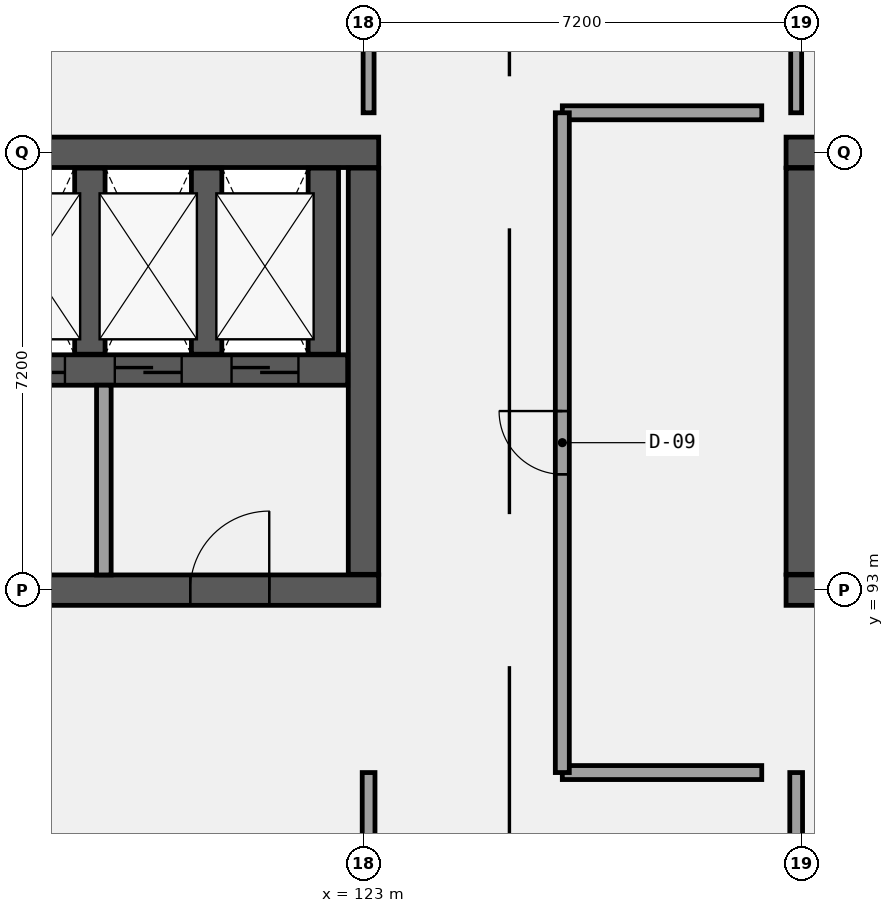
"""IFC4 building model, lengths in metres.
Left out: names, types, materials, properties, quantities, classifications, styles, units other than length and angle.
Written with IfcOpenShell. Run it as: python <this file> out.ifc"""

import sys

from ifc_helpers import new_model, si_unit, direction, frame, frame_2d, origin, place, context, subcontext, project, spatial, rectangle, extrude, element, fill, save


model = new_model("IFC4")
c1 = context("Model", 3, precision=1e-05, world=origin(), true_north=direction((0.0, 1.0)))
c2 = subcontext(c1, "Body", "Model", "MODEL_VIEW")
j1 = project(units=[si_unit("LENGTHUNIT", "METRE"), si_unit("PLANEANGLEUNIT", "RADIAN")], contexts=[c1])
p1 = place(None, origin())
s1 = spatial("IfcSite", under=j1, at=p1, CompositionType="ELEMENT")
p2 = place(p1, origin())
s2 = spatial("IfcBuilding", under=s1, at=p2, CompositionType="ELEMENT")
p3 = place(p2, frame((0.0, 0.0, 5.4)))
s3 = spatial("IfcBuildingStorey", under=s2, at=p3, CompositionType="ELEMENT", Elevation=5.4)
p4 = place(p3, frame((108.35, 100.2, 0.0), z_axis=(0.0, 0.0, 1.0), x_axis=(1.0, 0.0, 0.0)))
e1 = element("IfcWall", 1, at=p4, inside=s3, PredefinedType="SHEAR", context=c2, shape_type="SweptSolid", body=[
    extrude(rectangle(XDim=14.9, YDim=0.5, at=frame_2d((7.45, 0.0))), origin(), (0.0, 0.0, 1.0), 4.2),
])
p5 = place(p3, frame((108.35, 93.0, 0.0), z_axis=(0.0, 0.0, 1.0), x_axis=(1.0, 0.0, 0.0)))
e2 = element("IfcWall", 2, at=p5, inside=s3, PredefinedType="SHEAR", context=c2, shape_type="SweptSolid", body=[
    extrude(rectangle(XDim=14.9, YDim=0.5, at=frame_2d((7.45, 0.0))), origin(), (0.0, 0.0, 1.0), 4.2),
])
p6 = place(p5, frame((3.8, 0.0, 0.0)))
e3 = element("IfcOpeningElement", 3, at=p6, cuts=e2, PredefinedType="OPENING", context=c2, shape_type="SweptSolid", body=[
    extrude(rectangle(XDim=1.3, YDim=2.2, at=frame_2d((0.65, 1.1))), frame((0.0, 0.26, 0.0), z_axis=(0.0, -1.0, 0.0), x_axis=(1.0, 0.0, 0.0)), (0.0, 0.0, 1.0), 0.52),
])
p7 = place(p5, frame((11.8, 0.0, 0.0)))
e4 = element("IfcOpeningElement", 4, at=p7, cuts=e2, PredefinedType="OPENING", context=c2, shape_type="SweptSolid", body=[
    extrude(rectangle(XDim=1.3, YDim=2.2, at=frame_2d((0.65, 1.1))), frame((0.0, 0.26, 0.0), z_axis=(0.0, -1.0, 0.0), x_axis=(1.0, 0.0, 0.0)), (0.0, 0.0, 1.0), 0.52),
])
p8 = place(p3, frame((123.0, 93.26, 0.0), z_axis=(0.0, 0.0, 1.0), x_axis=(0.0, 1.0, 0.0)))
e5 = element("IfcWall", 5, at=p8, inside=s3, PredefinedType="SHEAR", context=c2, shape_type="SweptSolid", body=[
    extrude(rectangle(XDim=6.68, YDim=0.5, at=frame_2d((3.34, 0.0))), origin(), (0.0, 0.0, 1.0), 4.2),
])
p9 = place(p3, frame((108.86, 96.62, 0.0), z_axis=(0.0, 0.0, 1.0), x_axis=(1.0, 0.0, 0.0)))
e6 = element("IfcWall", 6, at=p9, inside=s3, PredefinedType="SHEAR", context=c2, shape_type="SweptSolid", body=[
    extrude(rectangle(XDim=13.88, YDim=0.5, at=frame_2d((6.94, 0.0))), origin(), (0.0, 0.0, 1.0), 4.2),
])
p10 = place(p9, frame((8.13, 0.0, 0.0)))
e7 = element("IfcOpeningElement", 7, at=p10, cuts=e6, PredefinedType="OPENING", context=c2, shape_type="SweptSolid", body=[
    extrude(rectangle(XDim=1.1, YDim=2.15, at=frame_2d((0.55, 1.075))), frame((0.0, 0.26, 0.0), z_axis=(0.0, -1.0, 0.0), x_axis=(1.0, 0.0, 0.0)), (0.0, 0.0, 1.0), 0.52),
])
p11 = place(p9, frame((10.05, 0.0, 0.0)))
e8 = element("IfcOpeningElement", 8, at=p11, cuts=e6, PredefinedType="OPENING", context=c2, shape_type="SweptSolid", body=[
    extrude(rectangle(XDim=1.1, YDim=2.15, at=frame_2d((0.55, 1.075))), frame((0.0, 0.26, 0.0), z_axis=(0.0, -1.0, 0.0), x_axis=(1.0, 0.0, 0.0)), (0.0, 0.0, 1.0), 0.52),
])
p12 = place(p9, frame((11.97, 0.0, 0.0)))
e9 = element("IfcOpeningElement", 9, at=p12, cuts=e6, PredefinedType="OPENING", context=c2, shape_type="SweptSolid", body=[
    extrude(rectangle(XDim=1.1, YDim=2.15, at=frame_2d((0.55, 1.075))), frame((0.0, 0.26, 0.0), z_axis=(0.0, -1.0, 0.0), x_axis=(1.0, 0.0, 0.0)), (0.0, 0.0, 1.0), 0.52),
])
p13 = place(p9, frame((0.315, 0.0, 0.0)))
e10 = element("IfcOpeningElement", 10, at=p13, cuts=e6, PredefinedType="OPENING", context=c2, shape_type="SweptSolid", body=[
    extrude(rectangle(XDim=1.15, YDim=2.15, at=frame_2d((0.575, 1.075))), frame((0.0, 0.26, 0.0), z_axis=(0.0, -1.0, 0.0), x_axis=(1.0, 0.0, 0.0)), (0.0, 0.0, 1.0), 0.52),
])
for number, where, z_axis, x_axis in (
    (11, (118.5, 96.88, 0.0), (0.0, 0.0, 1.0), (0.0, 1.0, 0.0)),
    (12, (120.42, 96.88, 0.0), (0.0, 0.0, 1.0), (0.0, 1.0, 0.0)),
    (13, (122.34, 96.88, 0.0), (0.0, 0.0, 1.0), (0.0, 1.0, 0.0)),
):
    element("IfcWall", number, at=place(p3, frame(where, z_axis=z_axis, x_axis=x_axis)), inside=s3, PredefinedType="SHEAR", context=c2, shape_type="SweptSolid", body=[
        extrude(rectangle(XDim=3.06, YDim=0.5, at=frame_2d((1.53, 0.0))), origin(), (0.0, 0.0, 1.0), 4.2),
    ])
p14 = place(p3, frame((129.95, 100.2, 0.0), z_axis=(0.0, 0.0, 1.0), x_axis=(1.0, 0.0, 0.0)))
e14 = element("IfcWall", 14, at=p14, inside=s3, PredefinedType="SHEAR", context=c2, shape_type="SweptSolid", body=[
    extrude(rectangle(XDim=14.9, YDim=0.5, at=frame_2d((7.45, 0.0))), origin(), (0.0, 0.0, 1.0), 4.2),
])
p15 = place(p3, frame((129.95, 93.0, 0.0), z_axis=(0.0, 0.0, 1.0), x_axis=(1.0, 0.0, 0.0)))
e15 = element("IfcWall", 15, at=p15, inside=s3, PredefinedType="SHEAR", context=c2, shape_type="SweptSolid", body=[
    extrude(rectangle(XDim=14.9, YDim=0.5, at=frame_2d((7.45, 0.0))), origin(), (0.0, 0.0, 1.0), 4.2),
])
p16 = place(p15, frame((3.8, 0.0, 0.0)))
e16 = element("IfcOpeningElement", 16, at=p16, cuts=e15, PredefinedType="OPENING", context=c2, shape_type="SweptSolid", body=[
    extrude(rectangle(XDim=1.3, YDim=2.2, at=frame_2d((0.65, 1.1))), frame((0.0, 0.26, 0.0), z_axis=(0.0, -1.0, 0.0), x_axis=(1.0, 0.0, 0.0)), (0.0, 0.0, 1.0), 0.52),
])
p17 = place(p15, frame((11.8, 0.0, 0.0)))
e17 = element("IfcOpeningElement", 17, at=p17, cuts=e15, PredefinedType="OPENING", context=c2, shape_type="SweptSolid", body=[
    extrude(rectangle(XDim=1.3, YDim=2.2, at=frame_2d((0.65, 1.1))), frame((0.0, 0.26, 0.0), z_axis=(0.0, -1.0, 0.0), x_axis=(1.0, 0.0, 0.0)), (0.0, 0.0, 1.0), 0.52),
])
p18 = place(p3, frame((130.2, 93.26, 0.0), z_axis=(0.0, 0.0, 1.0), x_axis=(0.0, 1.0, 0.0)))
e18 = element("IfcWall", 18, at=p18, inside=s3, PredefinedType="SHEAR", context=c2, shape_type="SweptSolid", body=[
    extrude(rectangle(XDim=6.68, YDim=0.5, at=frame_2d((3.34, 0.0))), origin(), (0.0, 0.0, 1.0), 4.2),
])
p19 = place(p3, frame((118.73, 93.25, 0.0), z_axis=(0.0, 0.0, 1.0), x_axis=(0.0, 1.0, 0.0)))
e19 = element("IfcWall", 19, at=p19, inside=s3, PredefinedType="SOLIDWALL", context=c2, shape_type="SweptSolid", body=[
    extrude(rectangle(XDim=3.12, YDim=0.24, at=frame_2d((1.56, 0.0))), origin(), (0.0, 0.0, 1.0), 3.89),
])
p20 = place(p3, frame((123.084, 100.85, 0.0), z_axis=(0.0, 0.0, 1.0), x_axis=(0.0, 1.0, 0.0)))
e20 = element("IfcWall", 20, at=p20, inside=s3, PredefinedType="PARTITIONING", context=c2, shape_type="SweptSolid", body=[
    extrude(rectangle(XDim=7.29, YDim=0.18, at=frame_2d((3.645, 0.0))), origin(), (0.0, 0.0, 1.0), 3.27),
])
p21 = place(p3, frame((130.116, 100.85, 0.0), z_axis=(0.0, 0.0, 1.0), x_axis=(0.0, 1.0, 0.0)))
e21 = element("IfcWall", 21, at=p21, inside=s3, PredefinedType="PARTITIONING", context=c2, shape_type="SweptSolid", body=[
    extrude(rectangle(XDim=7.29, YDim=0.18, at=frame_2d((3.645, 0.0))), origin(), (0.0, 0.0, 1.0), 3.17),
])
for number, where, z_axis, x_axis in (
    (22, (123.084, 81.64, 0.0), (0.0, 0.0, 1.0), (0.0, 1.0, 0.0)),
    (23, (130.116, 81.64, 0.0), (0.0, 0.0, 1.0), (0.0, 1.0, 0.0)),
):
    element("IfcWall", number, at=place(p3, frame(where, z_axis=z_axis, x_axis=x_axis)), inside=s3, PredefinedType="PARTITIONING", context=c2, shape_type="SweptSolid", body=[
        extrude(rectangle(XDim=8.36, YDim=0.21, at=frame_2d((4.18, 0.0))), origin(), (0.0, 0.0, 1.0), 2.92),
    ])
for number, where, z_axis, x_axis in (
    (24, (126.27, 90.0, 0.0), (0.0, 0.0, 1.0), (1.0, 0.0, 0.0)),
    (25, (126.27, 100.85, 0.0), (0.0, 0.0, 1.0), (1.0, 0.0, 0.0)),
):
    element("IfcWall", number, at=place(p3, frame(where, z_axis=z_axis, x_axis=x_axis)), inside=s3, PredefinedType="PARTITIONING", context=c2, shape_type="SweptSolid", body=[
        extrude(rectangle(XDim=3.28, YDim=0.23, at=frame_2d((1.64, 0.0))), origin(), (0.0, 0.0, 1.0), 3.92),
    ])
p22 = place(p3, frame((126.27, 90.0, 0.0), z_axis=(0.0, 0.0, 1.0), x_axis=(0.0, 1.0, 0.0)))
e26 = element("IfcWall", 26, at=p22, inside=s3, PredefinedType="PARTITIONING", context=c2, shape_type="SweptSolid", body=[
    extrude(rectangle(XDim=10.85, YDim=0.23, at=frame_2d((5.425, 0.0))), origin(), (0.0, 0.0, 1.0), 3.92),
])
p23 = place(p22, frame((4.905, 0.0, 0.0)))
e27 = element("IfcOpeningElement", 27, at=p23, cuts=e26, PredefinedType="OPENING", context=c2, shape_type="SweptSolid", body=[
    extrude(rectangle(XDim=1.04, YDim=2.35, at=frame_2d((0.52, 1.175))), frame((0.0, 0.125, 0.0), z_axis=(0.0, -1.0, 0.0), x_axis=(1.0, 0.0, 0.0)), (0.0, 0.0, 1.0), 0.25),
])
p24 = place(p10, frame((1.1, 0.0, 0.0), z_axis=(0.0, 0.0, 1.0), x_axis=(-1.0, 0.0, 0.0)))
e28 = element("IfcDoor", 28, at=p24, inside=s3, OperationType="DOUBLE_DOOR_SLIDING", PredefinedType="DOOR", context=c2, shape_type="SweptSolid", body=[
    extrude(rectangle(XDim=1.1, YDim=2.15, at=frame_2d((0.55, 1.075))), frame((0.0, 0.025, 0.0), z_axis=(0.0, -1.0, 0.0), x_axis=(1.0, 0.0, 0.0)), (0.0, 0.0, 1.0), 0.05),
])
fill(e7, e28)
p25 = place(p11, frame((1.1, 0.0, 0.0), z_axis=(0.0, 0.0, 1.0), x_axis=(-1.0, 0.0, 0.0)))
e29 = element("IfcDoor", 29, at=p25, inside=s3, OperationType="DOUBLE_DOOR_SLIDING", PredefinedType="DOOR", context=c2, shape_type="SweptSolid", body=[
    extrude(rectangle(XDim=1.1, YDim=2.15, at=frame_2d((0.55, 1.075))), frame((0.0, 0.025, 0.0), z_axis=(0.0, -1.0, 0.0), x_axis=(1.0, 0.0, 0.0)), (0.0, 0.0, 1.0), 0.05),
])
fill(e8, e29)
p26 = place(p12, frame((1.1, 0.0, 0.0), z_axis=(0.0, 0.0, 1.0), x_axis=(-1.0, 0.0, 0.0)))
e30 = element("IfcDoor", 30, at=p26, inside=s3, OperationType="DOUBLE_DOOR_SLIDING", PredefinedType="DOOR", context=c2, shape_type="SweptSolid", body=[
    extrude(rectangle(XDim=1.1, YDim=2.15, at=frame_2d((0.55, 1.075))), frame((0.0, 0.025, 0.0), z_axis=(0.0, -1.0, 0.0), x_axis=(1.0, 0.0, 0.0)), (0.0, 0.0, 1.0), 0.05),
])
fill(e9, e30)
p27 = place(p7, frame((1.3, 0.0, 0.0), z_axis=(0.0, 0.0, 1.0), x_axis=(-1.0, 0.0, 0.0)))
e31 = element("IfcDoor", 31, at=p27, inside=s3, OperationType="SINGLE_SWING_RIGHT", PredefinedType="DOOR", context=c2, shape_type="SweptSolid", body=[
    extrude(rectangle(XDim=1.3, YDim=2.2, at=frame_2d((0.65, 1.1))), frame((0.0, 0.025, 0.0), z_axis=(0.0, -1.0, 0.0), x_axis=(1.0, 0.0, 0.0)), (0.0, 0.0, 1.0), 0.05),
])
fill(e4, e31)
p28 = place(p23, origin())
e32 = element("IfcDoor", 32, at=p28, inside=s3, OperationType="SINGLE_SWING_RIGHT", PredefinedType="DOOR", context=c2, shape_type="SweptSolid", body=[
    extrude(rectangle(XDim=1.04, YDim=2.35, at=frame_2d((0.52, 1.175))), frame((0.0, 0.025, 0.0), z_axis=(0.0, -1.0, 0.0), x_axis=(1.0, 0.0, 0.0)), (0.0, 0.0, 1.0), 0.05),
])
fill(e27, e32)
save(model, sys.argv[1])
